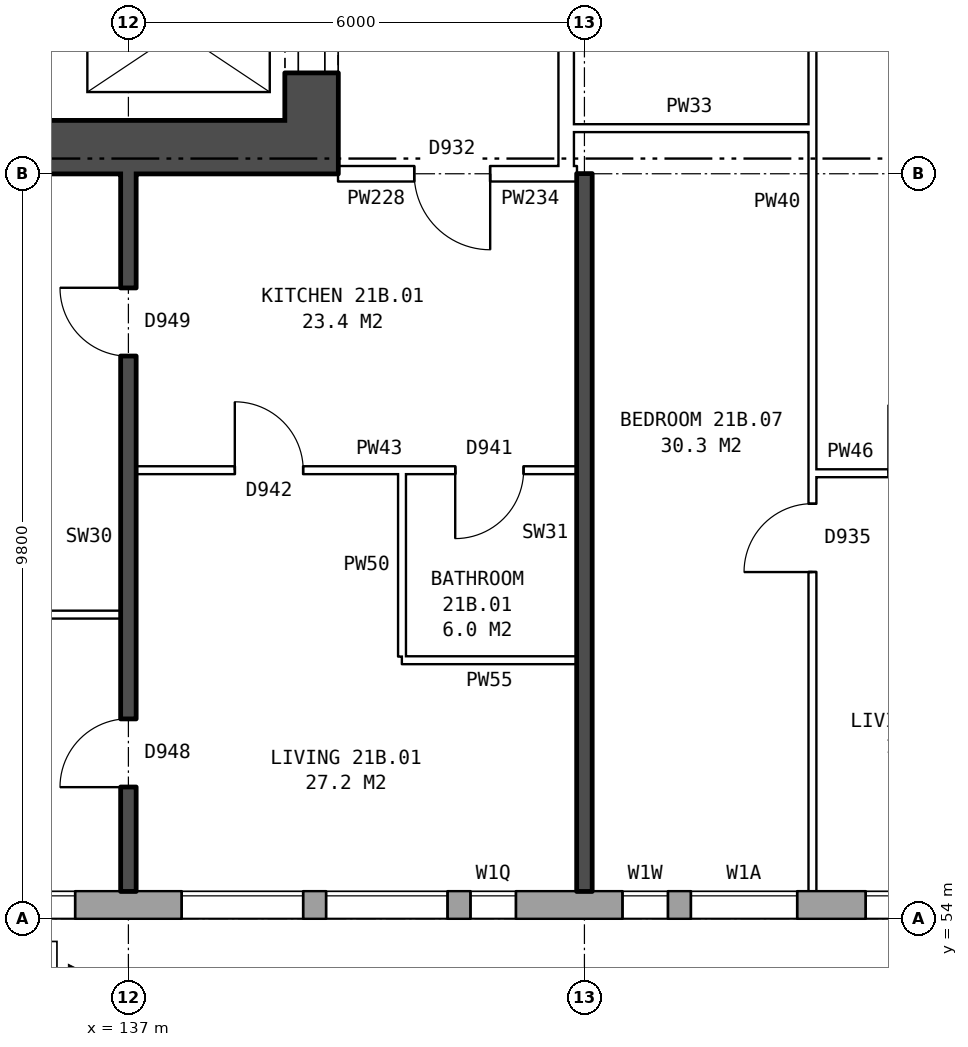
"""IFC4 building model, lengths in metres.
Left out: names, types, materials, properties, quantities, classifications, styles, units other than length and angle.
Written with IfcOpenShell. Run it as: python <this file> out.ifc"""

import sys

from ifc_helpers import new_model, si_unit, direction, frame, frame_2d, origin, place, context, subcontext, project, spatial, rectangle, extrude, element, fill, save


model = new_model("IFC4")
c1 = context("Model", 3, precision=1e-05, world=origin(), true_north=direction((0.0, 1.0)))
c2 = subcontext(c1, "Body", "Model", "MODEL_VIEW")
j1 = project(units=[si_unit("LENGTHUNIT", "METRE"), si_unit("PLANEANGLEUNIT", "RADIAN")], contexts=[c1])
p1 = place(None, origin())
s1 = spatial("IfcSite", under=j1, at=p1, CompositionType="ELEMENT")
p2 = place(p1, origin())
s2 = spatial("IfcBuilding", under=s1, at=p2, CompositionType="ELEMENT")
p3 = place(p2, frame((0.0, 0.0, 77.8)))
s3 = spatial("IfcBuildingStorey", under=s2, at=p3, CompositionType="ELEMENT", Elevation=77.8)
p4 = place(p3, frame((134.075, 54.18, 0.0), z_axis=(0.0, 0.0, 1.0), x_axis=(1.0, 0.0, 0.0)))
e1 = element("IfcWall", 1, at=p4, inside=s3, PredefinedType="STANDARD", context=c2, shape_type="SweptSolid", body=[
    extrude(rectangle(XDim=38.101, YDim=0.36, at=frame_2d((19.05, 0.0))), origin(), (0.0, 0.0, 1.0), 2.85),
])
p5 = place(p4, frame((0.625, 0.0, 0.8)))
e2 = element("IfcOpeningElement", 2, at=p5, cuts=e1, PredefinedType="OPENING", context=c2, shape_type="SweptSolid", body=[
    extrude(rectangle(XDim=1.6, YDim=1.8, at=frame_2d((0.8, 0.9))), frame((0.0, 0.19, 0.0), z_axis=(0.0, -1.0, 0.0), x_axis=(1.0, 0.0, 0.0)), (0.0, 0.0, 1.0), 0.38),
])
p6 = place(p4, frame((3.625, 0.0, 0.8)))
e3 = element("IfcOpeningElement", 3, at=p6, cuts=e1, PredefinedType="OPENING", context=c2, shape_type="SweptSolid", body=[
    extrude(rectangle(XDim=1.6, YDim=1.8, at=frame_2d((0.8, 0.9))), frame((0.0, 0.19, 0.0), z_axis=(0.0, -1.0, 0.0), x_axis=(1.0, 0.0, 0.0)), (0.0, 0.0, 1.0), 0.38),
])
p7 = place(p4, frame((5.525, 0.0, 0.8)))
e4 = element("IfcOpeningElement", 4, at=p7, cuts=e1, PredefinedType="OPENING", context=c2, shape_type="SweptSolid", body=[
    extrude(rectangle(XDim=1.6, YDim=1.8, at=frame_2d((0.8, 0.9))), frame((0.0, 0.19, 0.0), z_axis=(0.0, -1.0, 0.0), x_axis=(1.0, 0.0, 0.0)), (0.0, 0.0, 1.0), 0.38),
])
p8 = place(p4, frame((9.425, 0.0, 0.65)))
e5 = element("IfcOpeningElement", 5, at=p8, cuts=e1, PredefinedType="OPENING", context=c2, shape_type="SweptSolid", body=[
    extrude(rectangle(XDim=0.6, YDim=0.9, at=frame_2d((0.3, 0.45))), frame((0.0, 0.19, 0.0), z_axis=(0.0, -1.0, 0.0), x_axis=(1.0, 0.0, 0.0)), (0.0, 0.0, 1.0), 0.38),
])
p9 = place(p4, frame((12.625, 0.0, 0.8)))
e6 = element("IfcOpeningElement", 6, at=p9, cuts=e1, PredefinedType="OPENING", context=c2, shape_type="SweptSolid", body=[
    extrude(rectangle(XDim=1.6, YDim=1.8, at=frame_2d((0.8, 0.9))), frame((0.0, 0.19, 0.0), z_axis=(0.0, -1.0, 0.0), x_axis=(1.0, 0.0, 0.0)), (0.0, 0.0, 1.0), 0.38),
])
p10 = place(p4, frame((15.625, 0.0, 0.8)))
e7 = element("IfcOpeningElement", 7, at=p10, cuts=e1, PredefinedType="OPENING", context=c2, shape_type="SweptSolid", body=[
    extrude(rectangle(XDim=1.6, YDim=1.8, at=frame_2d((0.8, 0.9))), frame((0.0, 0.19, 0.0), z_axis=(0.0, -1.0, 0.0), x_axis=(1.0, 0.0, 0.0)), (0.0, 0.0, 1.0), 0.38),
])
p11 = place(p4, frame((18.625, 0.0, 0.8)))
e8 = element("IfcOpeningElement", 8, at=p11, cuts=e1, PredefinedType="OPENING", context=c2, shape_type="SweptSolid", body=[
    extrude(rectangle(XDim=1.6, YDim=1.8, at=frame_2d((0.8, 0.9))), frame((0.0, 0.19, 0.0), z_axis=(0.0, -1.0, 0.0), x_axis=(1.0, 0.0, 0.0)), (0.0, 0.0, 1.0), 0.38),
])
p12 = place(p4, frame((21.625, 0.0, 0.8)))
e9 = element("IfcOpeningElement", 9, at=p12, cuts=e1, PredefinedType="OPENING", context=c2, shape_type="SweptSolid", body=[
    extrude(rectangle(XDim=1.6, YDim=1.8, at=frame_2d((0.8, 0.9))), frame((0.0, 0.19, 0.0), z_axis=(0.0, -1.0, 0.0), x_axis=(1.0, 0.0, 0.0)), (0.0, 0.0, 1.0), 0.38),
])
p13 = place(p4, frame((24.625, 0.0, 0.8)))
e10 = element("IfcOpeningElement", 10, at=p13, cuts=e1, PredefinedType="OPENING", context=c2, shape_type="SweptSolid", body=[
    extrude(rectangle(XDim=1.6, YDim=1.8, at=frame_2d((0.8, 0.9))), frame((0.0, 0.19, 0.0), z_axis=(0.0, -1.0, 0.0), x_axis=(1.0, 0.0, 0.0)), (0.0, 0.0, 1.0), 0.38),
])
p14 = place(p4, frame((27.125, 0.0, 0.8)))
e11 = element("IfcOpeningElement", 11, at=p14, cuts=e1, PredefinedType="OPENING", context=c2, shape_type="SweptSolid", body=[
    extrude(rectangle(XDim=1.4, YDim=0.9, at=frame_2d((0.7, 0.45))), frame((0.0, 0.19, 0.0), z_axis=(0.0, -1.0, 0.0), x_axis=(1.0, 0.0, 0.0)), (0.0, 0.0, 1.0), 0.38),
])
p15 = place(p4, frame((30.625, 0.0, 0.8)))
e12 = element("IfcOpeningElement", 12, at=p15, cuts=e1, PredefinedType="OPENING", context=c2, shape_type="SweptSolid", body=[
    extrude(rectangle(XDim=1.6, YDim=1.8, at=frame_2d((0.8, 0.9))), frame((0.0, 0.19, 0.0), z_axis=(0.0, -1.0, 0.0), x_axis=(1.0, 0.0, 0.0)), (0.0, 0.0, 1.0), 0.38),
])
p16 = place(p4, frame((33.625, 0.0, 0.8)))
e13 = element("IfcOpeningElement", 13, at=p16, cuts=e1, PredefinedType="OPENING", context=c2, shape_type="SweptSolid", body=[
    extrude(rectangle(XDim=1.6, YDim=1.8, at=frame_2d((0.8, 0.9))), frame((0.0, 0.19, 0.0), z_axis=(0.0, -1.0, 0.0), x_axis=(1.0, 0.0, 0.0)), (0.0, 0.0, 1.0), 0.38),
])
p17 = place(p4, frame((7.425, 0.0, 1.3)))
e14 = element("IfcOpeningElement", 14, at=p17, cuts=e1, PredefinedType="OPENING", context=c2, shape_type="SweptSolid", body=[
    extrude(rectangle(XDim=0.6, YDim=1.2, at=frame_2d((0.3, 0.6))), frame((0.0, 0.19, 0.0), z_axis=(0.0, -1.0, 0.0), x_axis=(1.0, 0.0, 0.0)), (0.0, 0.0, 1.0), 0.38),
])
p18 = place(p4, frame((10.325, 0.0, 0.65)))
e15 = element("IfcOpeningElement", 15, at=p18, cuts=e1, PredefinedType="OPENING", context=c2, shape_type="SweptSolid", body=[
    extrude(rectangle(XDim=1.4, YDim=1.8, at=frame_2d((0.7, 0.9))), frame((0.0, 0.19, 0.0), z_axis=(0.0, -1.0, 0.0), x_axis=(1.0, 0.0, 0.0)), (0.0, 0.0, 1.0), 0.38),
])
p19 = place(p4, frame((29.675, 0.0, 1.7)))
e16 = element("IfcOpeningElement", 16, at=p19, cuts=e1, PredefinedType="OPENING", context=c2, shape_type="SweptSolid", body=[
    extrude(rectangle(XDim=0.6, YDim=0.9, at=frame_2d((0.3, 0.45))), frame((0.0, 0.19, 0.0), z_axis=(0.0, -1.0, 0.0), x_axis=(1.0, 0.0, 0.0)), (0.0, 0.0, 1.0), 0.38),
])
p20 = place(p3, frame((139.41, 64.5, 0.0), z_axis=(0.0, 0.0, 1.0), x_axis=(0.0, 1.0, 0.0)))
e17 = element("IfcWall", 17, at=p20, inside=s3, PredefinedType="SHEAR", context=c2, shape_type="SweptSolid", body=[
    extrude(rectangle(XDim=11.0, YDim=0.7, at=frame_2d((5.5, 0.0))), origin(), (0.0, 0.0, 1.0), 2.85),
])
p21 = place(p20, frame((0.625, 0.0, 0.0)))
e18 = element("IfcOpeningElement", 18, at=p21, cuts=e17, PredefinedType="OPENING", context=c2, shape_type="SweptSolid", body=[
    extrude(rectangle(XDim=1.1, YDim=2.1, at=frame_2d((0.55, 1.05))), frame((0.0, 0.36, 0.0), z_axis=(0.0, -1.0, 0.0), x_axis=(1.0, 0.0, 0.0)), (0.0, 0.0, 1.0), 0.72),
])
p22 = place(p20, frame((9.2, 0.0, 0.0)))
e19 = element("IfcOpeningElement", 19, at=p22, cuts=e17, PredefinedType="OPENING", context=c2, shape_type="SweptSolid", body=[
    extrude(rectangle(XDim=1.1, YDim=2.1, at=frame_2d((0.55, 1.05))), frame((0.0, 0.36, 0.0), z_axis=(0.0, -1.0, 0.0), x_axis=(1.0, 0.0, 0.0)), (0.0, 0.0, 1.0), 0.72),
])
p23 = place(p20, frame((7.425, 0.0, 0.0)))
e20 = element("IfcOpeningElement", 20, at=p23, cuts=e17, PredefinedType="OPENING", context=c2, shape_type="SweptSolid", body=[
    extrude(rectangle(XDim=0.85, YDim=2.1, at=frame_2d((0.425, 1.05))), frame((0.0, 0.36, 0.0), z_axis=(0.0, -1.0, 0.0), x_axis=(1.0, 0.0, 0.0)), (0.0, 0.0, 1.0), 0.72),
])
p24 = place(p3, frame((139.76, 64.15, 0.0), z_axis=(0.0, 0.0, 1.0), x_axis=(-1.0, 0.0, 0.0)))
e21 = element("IfcWall", 21, at=p24, inside=s3, PredefinedType="SHEAR", context=c2, shape_type="SweptSolid", body=[
    extrude(rectangle(XDim=8.4, YDim=0.7, at=frame_2d((4.2, 0.0))), origin(), (0.0, 0.0, 1.0), 2.85),
])
p25 = place(p3, frame((142.76, 63.9, 0.0), z_axis=(0.0, 0.0, 1.0), x_axis=(0.0, 1.0, 0.0)))
e22 = element("IfcWall", 22, at=p25, inside=s3, PredefinedType="PARTITIONING", context=c2, shape_type="SweptSolid", body=[
    extrude(rectangle(XDim=12.2, YDim=0.2, at=frame_2d((6.1, 0.0))), origin(), (0.0, 0.0, 1.0), 2.85),
])
p26 = place(p25, frame((5.1, 0.0, 0.0)))
e23 = element("IfcOpeningElement", 23, at=p26, cuts=e22, PredefinedType="OPENING", context=c2, shape_type="SweptSolid", body=[
    extrude(rectangle(XDim=2.0, YDim=2.1, at=frame_2d((1.0, 1.05))), frame((0.0, 0.11, 0.0), z_axis=(0.0, -1.0, 0.0), x_axis=(1.0, 0.0, 0.0)), (0.0, 0.0, 1.0), 0.22),
])
p27 = place(p3, frame((140.6, 57.4, 0.0), z_axis=(0.0, 0.0, 1.0), x_axis=(1.0, 0.0, 0.0)))
e24 = element("IfcWall", 24, at=p27, inside=s3, PredefinedType="PARTITIONING", context=c2, shape_type="SweptSolid", body=[
    extrude(rectangle(XDim=2.3, YDim=0.1, at=frame_2d((1.15, 0.0))), origin(), (0.0, 0.0, 1.0), 2.85),
])
p28 = place(p3, frame((131.36, 58.0, 0.0), z_axis=(0.0, 0.0, 1.0), x_axis=(1.0, 0.0, 0.0)))
e25 = element("IfcWall", 25, at=p28, inside=s3, PredefinedType="PARTITIONING", context=c2, shape_type="SweptSolid", body=[
    extrude(rectangle(XDim=5.54, YDim=0.1, at=frame_2d((2.77, 0.0))), origin(), (0.0, 0.0, 1.0), 2.85),
])
p29 = place(p3, frame((146.0, 59.86, 0.0), z_axis=(0.0, 0.0, 1.0), x_axis=(1.0, 0.0, 0.0)))
e26 = element("IfcWall", 26, at=p29, inside=s3, PredefinedType="PARTITIONING", context=c2, shape_type="SweptSolid", body=[
    extrude(rectangle(XDim=2.9, YDim=0.1, at=frame_2d((1.45, 0.0))), origin(), (0.0, 0.0, 1.0), 2.85),
])
p30 = place(p29, frame((1.0, 0.0, 0.0)))
e27 = element("IfcOpeningElement", 27, at=p30, cuts=e26, PredefinedType="OPENING", context=c2, shape_type="SweptSolid", body=[
    extrude(rectangle(XDim=0.9, YDim=2.1, at=frame_2d((0.45, 1.05))), frame((0.0, 0.06, 0.0), z_axis=(0.0, -1.0, 0.0), x_axis=(1.0, 0.0, 0.0)), (0.0, 0.0, 1.0), 0.12),
])
p31 = place(p3, frame((137.1, 59.9, 0.0), z_axis=(0.0, 0.0, 1.0), x_axis=(1.0, 0.0, 0.0)))
e28 = element("IfcWall", 28, at=p31, inside=s3, PredefinedType="PARTITIONING", context=c2, shape_type="SweptSolid", body=[
    extrude(rectangle(XDim=5.8, YDim=0.1, at=frame_2d((2.9, 0.0))), origin(), (0.0, 0.0, 1.0), 2.85),
])
p32 = place(p31, frame((1.3, 0.0, 0.0)))
e29 = element("IfcOpeningElement", 29, at=p32, cuts=e28, PredefinedType="OPENING", context=c2, shape_type="SweptSolid", body=[
    extrude(rectangle(XDim=0.9, YDim=2.1, at=frame_2d((0.45, 1.05))), frame((0.0, 0.06, 0.0), z_axis=(0.0, -1.0, 0.0), x_axis=(1.0, 0.0, 0.0)), (0.0, 0.0, 1.0), 0.12),
])
p33 = place(p31, frame((4.2, 0.0, 0.0)))
e30 = element("IfcOpeningElement", 30, at=p33, cuts=e28, PredefinedType="OPENING", context=c2, shape_type="SweptSolid", body=[
    extrude(rectangle(XDim=0.9, YDim=2.1, at=frame_2d((0.45, 1.05))), frame((0.0, 0.06, 0.0), z_axis=(0.0, -1.0, 0.0), x_axis=(1.0, 0.0, 0.0)), (0.0, 0.0, 1.0), 0.12),
])
p34 = place(p3, frame((139.76, 63.8, 0.0), z_axis=(0.0, 0.0, 1.0), x_axis=(1.0, 0.0, 0.0)))
e31 = element("IfcWall", 31, at=p34, inside=s3, PredefinedType="PARTITIONING", context=c2, shape_type="SweptSolid", body=[
    extrude(rectangle(XDim=3.0, YDim=0.2, at=frame_2d((1.5, 0.0))), origin(), (0.0, 0.0, 1.0), 2.85),
])
p35 = place(p34, frame((1.0, 0.0, 0.0)))
e32 = element("IfcOpeningElement", 32, at=p35, cuts=e31, PredefinedType="OPENING", context=c2, shape_type="SweptSolid", body=[
    extrude(rectangle(XDim=1.0, YDim=2.1, at=frame_2d((0.5, 1.05))), frame((0.0, 0.11, 0.0), z_axis=(0.0, -1.0, 0.0), x_axis=(1.0, 0.0, 0.0)), (0.0, 0.0, 1.0), 0.22),
])
p36 = place(p3, frame((142.76, 63.8, 0.0), z_axis=(0.0, 0.0, 1.0), x_axis=(1.0, 0.0, 0.0)))
e33 = element("IfcWall", 33, at=p36, inside=s3, PredefinedType="PARTITIONING", context=c2, shape_type="SweptSolid", body=[
    extrude(rectangle(XDim=0.14, YDim=0.2, at=frame_2d((0.07, 0.0))), origin(), (0.0, 0.0, 1.0), 2.85),
])
p37 = place(p3, frame((142.76, 64.4, 0.0), z_axis=(0.0, 0.0, 1.0), x_axis=(1.0, 0.0, 0.0)))
e34 = element("IfcWall", 34, at=p37, inside=s3, PredefinedType="PARTITIONING", context=c2, shape_type="SweptSolid", body=[
    extrude(rectangle(XDim=3.24, YDim=0.1, at=frame_2d((1.62, 0.0))), origin(), (0.0, 0.0, 1.0), 2.85),
])
p38 = place(p3, frame((137.0, 54.36, 0.0), z_axis=(0.0, 0.0, 1.0), x_axis=(0.0, 1.0, 0.0)))
e35 = element("IfcWall", 35, at=p38, inside=s3, PredefinedType="SOLIDWALL", context=c2, shape_type="SweptSolid", body=[
    extrude(rectangle(XDim=9.44, YDim=0.2, at=frame_2d((4.72, 0.0))), origin(), (0.0, 0.0, 1.0), 2.85),
])
p39 = place(p38, frame((1.37, 0.0, 0.0)))
e36 = element("IfcOpeningElement", 36, at=p39, cuts=e35, PredefinedType="OPENING", context=c2, shape_type="SweptSolid", body=[
    extrude(rectangle(XDim=0.9, YDim=2.1, at=frame_2d((0.45, 1.05))), frame((0.0, 0.11, 0.0), z_axis=(0.0, -1.0, 0.0), x_axis=(1.0, 0.0, 0.0)), (0.0, 0.0, 1.0), 0.22),
])
p40 = place(p38, frame((7.04, 0.0, 0.0)))
e37 = element("IfcOpeningElement", 37, at=p40, cuts=e35, PredefinedType="OPENING", context=c2, shape_type="SweptSolid", body=[
    extrude(rectangle(XDim=0.9, YDim=2.1, at=frame_2d((0.45, 1.05))), frame((0.0, 0.11, 0.0), z_axis=(0.0, -1.0, 0.0), x_axis=(1.0, 0.0, 0.0)), (0.0, 0.0, 1.0), 0.22),
])
p41 = place(p3, frame((140.6, 57.45, 0.0), z_axis=(0.0, 0.0, 1.0), x_axis=(0.0, 1.0, 0.0)))
e38 = element("IfcWall", 38, at=p41, inside=s3, PredefinedType="PARTITIONING", context=c2, shape_type="SweptSolid", body=[
    extrude(rectangle(XDim=2.4, YDim=0.1, at=frame_2d((1.2, 0.0))), origin(), (0.0, 0.0, 1.0), 2.85),
])
p42 = place(p3, frame((143.0, 54.36, 0.0), z_axis=(0.0, 0.0, 1.0), x_axis=(0.0, 1.0, 0.0)))
e39 = element("IfcWall", 39, at=p42, inside=s3, PredefinedType="SOLIDWALL", context=c2, shape_type="SweptSolid", body=[
    extrude(rectangle(XDim=9.44, YDim=0.2, at=frame_2d((4.72, 0.0))), origin(), (0.0, 0.0, 1.0), 2.85),
])
p43 = place(p3, frame((146.0, 54.36, 0.0), z_axis=(0.0, 0.0, 1.0), x_axis=(0.0, 1.0, 0.0)))
e40 = element("IfcWall", 40, at=p43, inside=s3, PredefinedType="PARTITIONING", context=c2, shape_type="SweptSolid", body=[
    extrude(rectangle(XDim=14.34, YDim=0.1, at=frame_2d((7.17, 0.0))), origin(), (0.0, 0.0, 1.0), 2.85),
])
p44 = place(p43, frame((4.2, 0.0, 0.0)))
e41 = element("IfcOpeningElement", 41, at=p44, cuts=e40, PredefinedType="OPENING", context=c2, shape_type="SweptSolid", body=[
    extrude(rectangle(XDim=0.9, YDim=2.1, at=frame_2d((0.45, 1.05))), frame((0.0, 0.06, 0.0), z_axis=(0.0, -1.0, 0.0), x_axis=(1.0, 0.0, 0.0)), (0.0, 0.0, 1.0), 0.12),
])
p45 = place(p43, frame((13.04, 0.0, 0.0)))
e42 = element("IfcOpeningElement", 42, at=p45, cuts=e40, PredefinedType="OPENING", context=c2, shape_type="SweptSolid", body=[
    extrude(rectangle(XDim=0.9, YDim=2.1, at=frame_2d((0.45, 1.05))), frame((0.0, 0.06, 0.0), z_axis=(0.0, -1.0, 0.0), x_axis=(1.0, 0.0, 0.0)), (0.0, 0.0, 1.0), 0.12),
])
p46 = place(p5, origin())
e43 = element("IfcWindow", 43, at=p46, inside=s3, PartitioningType="SINGLE_PANEL", PredefinedType="WINDOW", context=c2, shape_type="SweptSolid", body=[
    extrude(rectangle(XDim=1.6, YDim=1.8, at=frame_2d((0.8, 0.9))), frame((0.0, 0.15, 0.0), z_axis=(0.0, -1.0, 0.0), x_axis=(1.0, 0.0, 0.0)), (0.0, 0.0, 1.0), 0.06),
])
fill(e2, e43)
p47 = place(p6, origin())
e44 = element("IfcWindow", 44, at=p47, inside=s3, PartitioningType="SINGLE_PANEL", PredefinedType="WINDOW", context=c2, shape_type="SweptSolid", body=[
    extrude(rectangle(XDim=1.6, YDim=1.8, at=frame_2d((0.8, 0.9))), frame((0.0, 0.15, 0.0), z_axis=(0.0, -1.0, 0.0), x_axis=(1.0, 0.0, 0.0)), (0.0, 0.0, 1.0), 0.06),
])
fill(e3, e44)
p48 = place(p7, origin())
e45 = element("IfcWindow", 45, at=p48, inside=s3, PartitioningType="SINGLE_PANEL", PredefinedType="WINDOW", context=c2, shape_type="SweptSolid", body=[
    extrude(rectangle(XDim=1.6, YDim=1.8, at=frame_2d((0.8, 0.9))), frame((0.0, 0.15, 0.0), z_axis=(0.0, -1.0, 0.0), x_axis=(1.0, 0.0, 0.0)), (0.0, 0.0, 1.0), 0.06),
])
fill(e4, e45)
p49 = place(p8, origin())
e46 = element("IfcWindow", 46, at=p49, inside=s3, PartitioningType="SINGLE_PANEL", PredefinedType="WINDOW", context=c2, shape_type="SweptSolid", body=[
    extrude(rectangle(XDim=0.6, YDim=0.9, at=frame_2d((0.3, 0.45))), frame((0.0, 0.15, 0.0), z_axis=(0.0, -1.0, 0.0), x_axis=(1.0, 0.0, 0.0)), (0.0, 0.0, 1.0), 0.06),
])
fill(e5, e46)
p50 = place(p9, origin())
e47 = element("IfcWindow", 47, at=p50, inside=s3, PartitioningType="SINGLE_PANEL", PredefinedType="WINDOW", context=c2, shape_type="SweptSolid", body=[
    extrude(rectangle(XDim=1.6, YDim=1.8, at=frame_2d((0.8, 0.9))), frame((0.0, 0.15, 0.0), z_axis=(0.0, -1.0, 0.0), x_axis=(1.0, 0.0, 0.0)), (0.0, 0.0, 1.0), 0.06),
])
fill(e6, e47)
p51 = place(p21, origin())
e48 = element("IfcDoor", 48, at=p51, inside=s3, OperationType="DOUBLE_DOOR_SLIDING", PredefinedType="DOOR", context=c2, shape_type="SweptSolid", body=[
    extrude(rectangle(XDim=1.1, YDim=2.1, at=frame_2d((0.55, 1.05))), frame((0.0, 0.335, 0.0), z_axis=(0.0, -1.0, 0.0), x_axis=(1.0, 0.0, 0.0)), (0.0, 0.0, 1.0), 0.05),
])
fill(e18, e48)
p52 = place(p39, origin())
e49 = element("IfcDoor", 49, at=p52, inside=s3, OperationType="SINGLE_SWING_LEFT", PredefinedType="DOOR", context=c2, shape_type="SweptSolid", body=[
    extrude(rectangle(XDim=0.9, YDim=2.1, at=frame_2d((0.45, 1.05))), frame((0.0, 0.025, 0.0), z_axis=(0.0, -1.0, 0.0), x_axis=(1.0, 0.0, 0.0)), (0.0, 0.0, 1.0), 0.05),
])
fill(e36, e49)
p53 = place(p40, origin())
e50 = element("IfcDoor", 50, at=p53, inside=s3, OperationType="SINGLE_SWING_RIGHT", PredefinedType="DOOR", context=c2, shape_type="SweptSolid", body=[
    extrude(rectangle(XDim=0.9, YDim=2.1, at=frame_2d((0.45, 1.05))), frame((0.0, 0.025, 0.0), z_axis=(0.0, -1.0, 0.0), x_axis=(1.0, 0.0, 0.0)), (0.0, 0.0, 1.0), 0.05),
])
fill(e37, e50)
p54 = place(p35, frame((1.0, 0.0, 0.0), z_axis=(0.0, 0.0, 1.0), x_axis=(-1.0, 0.0, 0.0)))
e51 = element("IfcDoor", 51, at=p54, inside=s3, OperationType="SINGLE_SWING_LEFT", PredefinedType="DOOR", context=c2, shape_type="SweptSolid", body=[
    extrude(rectangle(XDim=1.0, YDim=2.1, at=frame_2d((0.5, 1.05))), frame((0.0, 0.025, 0.0), z_axis=(0.0, -1.0, 0.0), x_axis=(1.0, 0.0, 0.0)), (0.0, 0.0, 1.0), 0.05),
])
fill(e32, e51)
p55 = place(p32, origin())
e52 = element("IfcDoor", 52, at=p55, inside=s3, OperationType="SINGLE_SWING_LEFT", PredefinedType="DOOR", context=c2, shape_type="SweptSolid", body=[
    extrude(rectangle(XDim=0.9, YDim=2.1, at=frame_2d((0.45, 1.05))), frame((0.0, 0.025, 0.0), z_axis=(0.0, -1.0, 0.0), x_axis=(1.0, 0.0, 0.0)), (0.0, 0.0, 1.0), 0.05),
])
fill(e29, e52)
p56 = place(p33, frame((0.9, 0.0, 0.0), z_axis=(0.0, 0.0, 1.0), x_axis=(-1.0, 0.0, 0.0)))
e53 = element("IfcDoor", 53, at=p56, inside=s3, OperationType="SINGLE_SWING_RIGHT", PredefinedType="DOOR", context=c2, shape_type="SweptSolid", body=[
    extrude(rectangle(XDim=0.9, YDim=2.1, at=frame_2d((0.45, 1.05))), frame((0.0, 0.025, 0.0), z_axis=(0.0, -1.0, 0.0), x_axis=(1.0, 0.0, 0.0)), (0.0, 0.0, 1.0), 0.05),
])
fill(e30, e53)
p57 = place(p44, origin())
e54 = element("IfcDoor", 54, at=p57, inside=s3, OperationType="SINGLE_SWING_LEFT", PredefinedType="DOOR", context=c2, shape_type="SweptSolid", body=[
    extrude(rectangle(XDim=0.9, YDim=2.1, at=frame_2d((0.45, 1.05))), frame((0.0, 0.025, 0.0), z_axis=(0.0, -1.0, 0.0), x_axis=(1.0, 0.0, 0.0)), (0.0, 0.0, 1.0), 0.05),
])
fill(e41, e54)
p58 = place(p17, origin())
e55 = element("IfcWindow", 55, at=p58, inside=s3, PartitioningType="SINGLE_PANEL", PredefinedType="WINDOW", context=c2, shape_type="SweptSolid", body=[
    extrude(rectangle(XDim=0.6, YDim=1.2, at=frame_2d((0.3, 0.6))), frame((0.0, 0.15, 0.0), z_axis=(0.0, -1.0, 0.0), x_axis=(1.0, 0.0, 0.0)), (0.0, 0.0, 1.0), 0.06),
])
fill(e14, e55)
p59 = place(p18, origin())
e56 = element("IfcWindow", 56, at=p59, inside=s3, PartitioningType="SINGLE_PANEL", PredefinedType="WINDOW", context=c2, shape_type="SweptSolid", body=[
    extrude(rectangle(XDim=1.4, YDim=1.8, at=frame_2d((0.7, 0.9))), frame((0.0, 0.15, 0.0), z_axis=(0.0, -1.0, 0.0), x_axis=(1.0, 0.0, 0.0)), (0.0, 0.0, 1.0), 0.06),
])
fill(e15, e56)
save(model, sys.argv[1])
